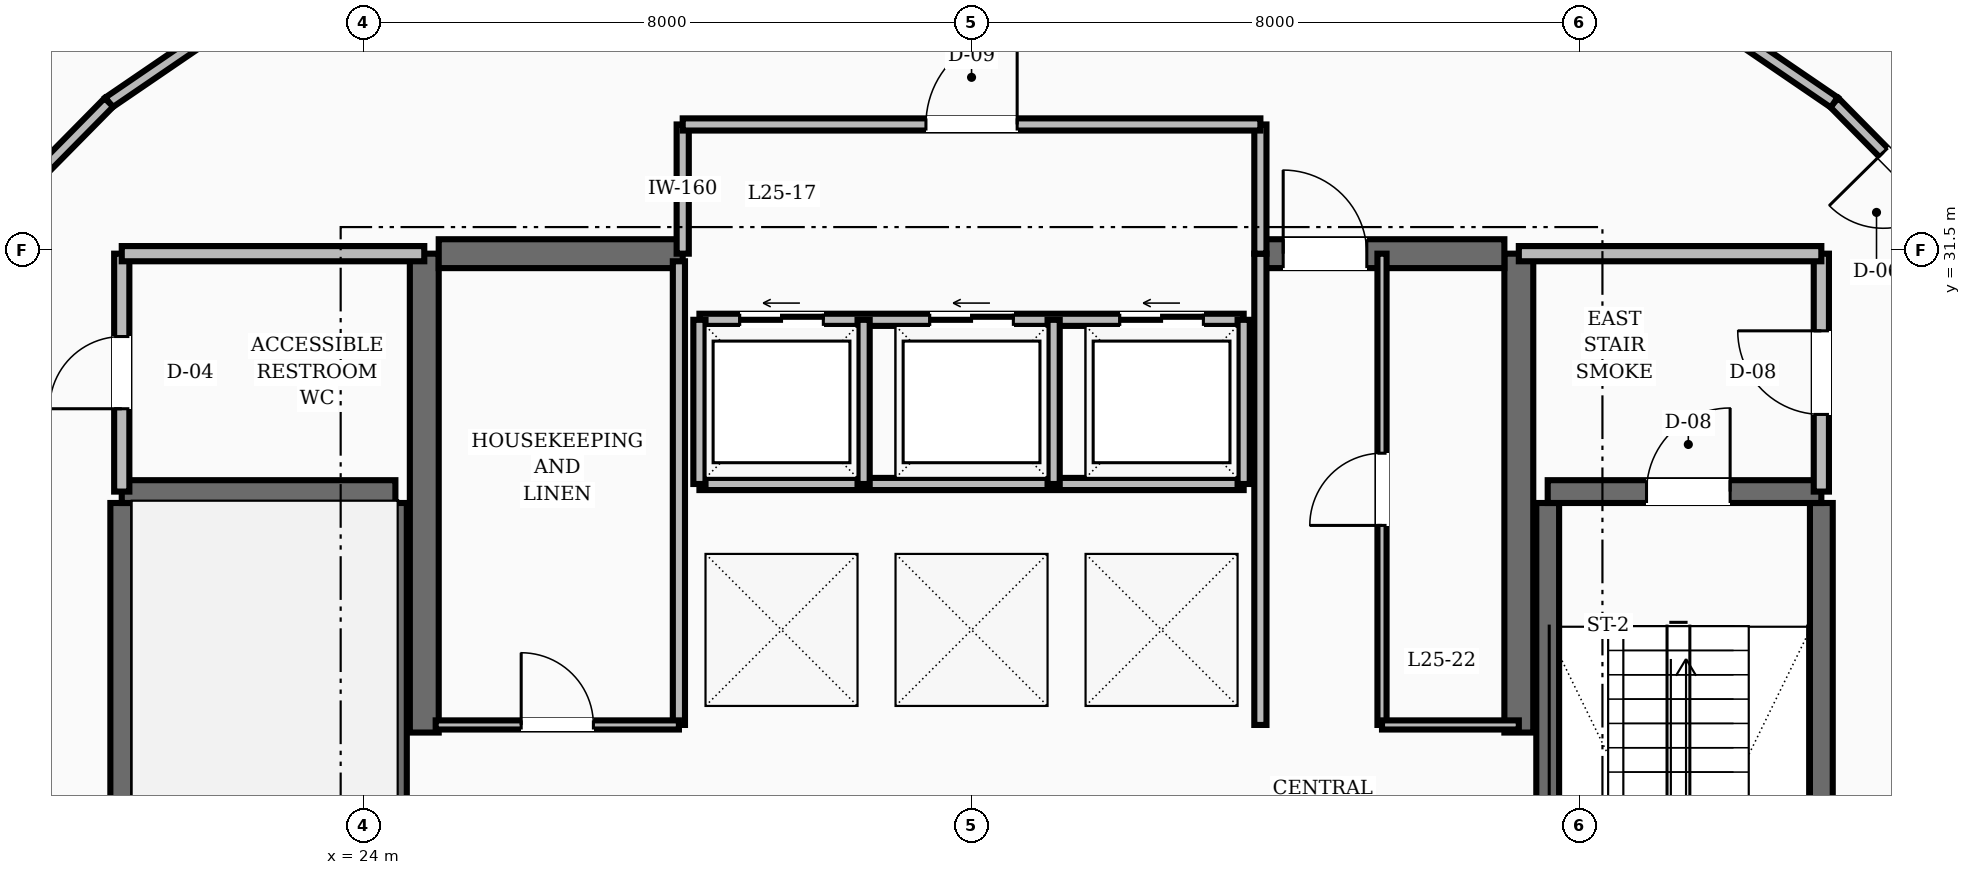
"""IFC4 building model, lengths in metres.
Left out: names, types, materials, properties, quantities, classifications, styles, units other than length and angle.
Written with IfcOpenShell. Run it as: python <this file> out.ifc"""

import sys

from ifc_helpers import new_model, si_unit, direction, frame, frame_2d, origin, place, context, subcontext, project, spatial, rectangle, extrude, element, fill, save


model = new_model("IFC4")
c1 = context("Model", 3, precision=1e-05, world=origin(), true_north=direction((0.0, 1.0)))
c2 = subcontext(c1, "Body", "Model", "MODEL_VIEW")
j1 = project(units=[si_unit("LENGTHUNIT", "METRE"), si_unit("PLANEANGLEUNIT", "RADIAN")], contexts=[c1])
p1 = place(None, origin())
s1 = spatial("IfcSite", under=j1, at=p1, CompositionType="ELEMENT")
p2 = place(p1, origin())
s2 = spatial("IfcBuilding", under=s1, at=p2, CompositionType="ELEMENT")
p3 = place(p2, frame((0.0, 0.0, 98.8)))
s3 = spatial("IfcBuildingStorey", under=s2, at=p3, CompositionType="ELEMENT", Elevation=98.8)
for number, where, z_axis, x_axis in (
    (1, (24.8, 25.15, 0.0), (0.0, 0.0, 1.0), (0.0, 1.0, 0.0)),
    (2, (39.2, 25.15, 0.0), (0.0, 0.0, 1.0), (0.0, 1.0, 0.0)),
):
    element("IfcWall", number, at=place(p3, frame(where, z_axis=z_axis, x_axis=x_axis)), inside=s3, PredefinedType="SHEAR", context=c2, shape_type="SweptSolid", body=[
        extrude(rectangle(XDim=6.3, YDim=0.38, at=frame_2d((3.15, 0.0))), origin(), (0.0, 0.0, 1.0), 3.6),
    ])
p4 = place(p3, frame((24.99, 31.45, 0.0), z_axis=(0.0, 0.0, 1.0), x_axis=(1.0, 0.0, 0.0)))
e3 = element("IfcWall", 3, at=p4, inside=s3, PredefinedType="SHEAR", context=c2, shape_type="SweptSolid", body=[
    extrude(rectangle(XDim=3.21, YDim=0.38, at=frame_2d((1.605, 0.0))), origin(), (0.0, 0.0, 1.0), 3.6),
])
p5 = place(p3, frame((35.8, 31.45, 0.0), z_axis=(0.0, 0.0, 1.0), x_axis=(1.0, 0.0, 0.0)))
e4 = element("IfcWall", 4, at=p5, inside=s3, PredefinedType="SHEAR", context=c2, shape_type="SweptSolid", body=[
    extrude(rectangle(XDim=3.21, YDim=0.38, at=frame_2d((1.605, 0.0))), origin(), (0.0, 0.0, 1.0), 3.6),
])
p6 = place(p5, frame((0.3, 0.0, 0.0)))
e5 = element("IfcOpeningElement", 5, at=p6, cuts=e4, PredefinedType="OPENING", context=c2, shape_type="SweptSolid", body=[
    extrude(rectangle(XDim=1.1, YDim=2.1, at=frame_2d((0.55, 1.05))), frame((0.0, 0.2, 0.0), z_axis=(0.0, -1.0, 0.0), x_axis=(1.0, 0.0, 0.0)), (0.0, 0.0, 1.0), 0.4),
])
for number, where, z_axis, x_axis in (
    (6, (20.82, 19.43, 0.0), (0.0, 0.0, 1.0), (0.0, 1.0, 0.0)),
    (7, (24.42, 19.43, 0.0), (0.0, 0.0, 1.0), (0.0, 1.0, 0.0)),
):
    element("IfcWall", number, at=place(p3, frame(where, z_axis=z_axis, x_axis=x_axis)), inside=s3, PredefinedType="SHEAR", context=c2, shape_type="SweptSolid", body=[
        extrude(rectangle(XDim=8.74, YDim=0.3, at=frame_2d((4.37, 0.0))), origin(), (0.0, 0.0, 1.0), 3.6),
    ])
p7 = place(p3, frame((20.82, 28.32, 0.0), z_axis=(0.0, 0.0, 1.0), x_axis=(1.0, 0.0, 0.0)))
e8 = element("IfcWall", 8, at=p7, inside=s3, PredefinedType="SHEAR", context=c2, shape_type="SweptSolid", body=[
    extrude(rectangle(XDim=3.6, YDim=0.3, at=frame_2d((1.8, 0.0))), origin(), (0.0, 0.0, 1.0), 3.6),
])
for number, where, z_axis, x_axis in (
    (9, (43.18, 19.43, 0.0), (0.0, 0.0, 1.0), (0.0, 1.0, 0.0)),
    (10, (39.58, 19.43, 0.0), (0.0, 0.0, 1.0), (0.0, 1.0, 0.0)),
):
    element("IfcWall", number, at=place(p3, frame(where, z_axis=z_axis, x_axis=x_axis)), inside=s3, PredefinedType="SHEAR", context=c2, shape_type="SweptSolid", body=[
        extrude(rectangle(XDim=8.74, YDim=0.3, at=frame_2d((4.37, 0.0))), origin(), (0.0, 0.0, 1.0), 3.6),
    ])
p8 = place(p3, frame((39.58, 28.32, 0.0), z_axis=(0.0, 0.0, 1.0), x_axis=(1.0, 0.0, 0.0)))
e11 = element("IfcWall", 11, at=p8, inside=s3, PredefinedType="SHEAR", context=c2, shape_type="SweptSolid", body=[
    extrude(rectangle(XDim=3.6, YDim=0.3, at=frame_2d((1.8, 0.0))), origin(), (0.0, 0.0, 1.0), 3.6),
])
p9 = place(p8, frame((1.3, 0.0, 0.0)))
e12 = element("IfcOpeningElement", 12, at=p9, cuts=e11, PredefinedType="OPENING", context=c2, shape_type="SweptSolid", body=[
    extrude(rectangle(XDim=1.1, YDim=2.1, at=frame_2d((0.55, 1.05))), frame((0.0, 0.16, 0.0), z_axis=(0.0, -1.0, 0.0), x_axis=(1.0, 0.0, 0.0)), (0.0, 0.0, 1.0), 0.32),
])
p10 = place(p3, frame((43.18, 28.32, 0.0), z_axis=(0.0, 0.0, 1.0), x_axis=(0.0, 1.0, 0.0)))
e13 = element("IfcWall", 13, at=p10, inside=s3, PredefinedType="SOLIDWALL", context=c2, shape_type="SweptSolid", body=[
    extrude(rectangle(XDim=3.13, YDim=0.2, at=frame_2d((1.565, 0.0))), origin(), (0.0, 0.0, 1.0), 2.71),
])
p11 = place(p10, frame((1.015, 0.0, 0.0)))
e14 = element("IfcOpeningElement", 14, at=p11, cuts=e13, PredefinedType="OPENING", context=c2, shape_type="SweptSolid", body=[
    extrude(rectangle(XDim=1.1, YDim=2.1, at=frame_2d((0.55, 1.05))), frame((0.0, 0.11, 0.0), z_axis=(0.0, -1.0, 0.0), x_axis=(1.0, 0.0, 0.0)), (0.0, 0.0, 1.0), 0.22),
])
p12 = place(p3, frame((39.2, 31.45, 0.0), z_axis=(0.0, 0.0, 1.0), x_axis=(1.0, 0.0, 0.0)))
e15 = element("IfcWall", 15, at=p12, inside=s3, PredefinedType="SOLIDWALL", context=c2, shape_type="SweptSolid", body=[
    extrude(rectangle(XDim=3.98, YDim=0.2, at=frame_2d((1.99, 0.0))), origin(), (0.0, 0.0, 1.0), 2.71),
])
p13 = place(p3, frame((20.82, 28.32, 0.0), z_axis=(0.0, 0.0, 1.0), x_axis=(0.0, 1.0, 0.0)))
e16 = element("IfcWall", 16, at=p13, inside=s3, PredefinedType="SOLIDWALL", context=c2, shape_type="SweptSolid", body=[
    extrude(rectangle(XDim=3.13, YDim=0.2, at=frame_2d((1.565, 0.0))), origin(), (0.0, 0.0, 1.0), 2.71),
])
p14 = place(p13, frame((1.09, 0.0, 0.0)))
e17 = element("IfcOpeningElement", 17, at=p14, cuts=e16, PredefinedType="OPENING", context=c2, shape_type="SweptSolid", body=[
    extrude(rectangle(XDim=0.95, YDim=2.1, at=frame_2d((0.475, 1.05))), frame((0.0, 0.11, 0.0), z_axis=(0.0, -1.0, 0.0), x_axis=(1.0, 0.0, 0.0)), (0.0, 0.0, 1.0), 0.22),
])
p15 = place(p3, frame((20.82, 31.45, 0.0), z_axis=(0.0, 0.0, 1.0), x_axis=(1.0, 0.0, 0.0)))
e18 = element("IfcWall", 18, at=p15, inside=s3, PredefinedType="SOLIDWALL", context=c2, shape_type="SweptSolid", body=[
    extrude(rectangle(XDim=3.98, YDim=0.2, at=frame_2d((1.99, 0.0))), origin(), (0.0, 0.0, 1.0), 2.71),
])
p16 = place(p3, frame((35.8, 25.25, 0.0), z_axis=(0.0, 0.0, 1.0), x_axis=(0.0, 1.0, 0.0)))
e19 = element("IfcWall", 19, at=p16, inside=s3, PredefinedType="SOLIDWALL", context=c2, shape_type="SweptSolid", body=[
    extrude(rectangle(XDim=6.2, YDim=0.16, at=frame_2d((3.1, 0.0))), origin(), (0.0, 0.0, 1.0), 2.71),
])
p17 = place(p3, frame((28.42, 30.58, 0.0), z_axis=(0.0, 0.0, 1.0), x_axis=(1.0, 0.0, 0.0)))
e20 = element("IfcWall", 20, at=p17, inside=s3, PredefinedType="SOLIDWALL", context=c2, shape_type="SweptSolid", body=[
    extrude(rectangle(XDim=7.16, YDim=0.16, at=frame_2d((3.58, 0.0))), origin(), (0.0, 0.0, 1.0), 2.71),
])
p18 = place(p17, frame((0.53, 0.0, 0.0)))
e21 = element("IfcOpeningElement", 21, at=p18, cuts=e20, PredefinedType="OPENING", context=c2, shape_type="SweptSolid", body=[
    extrude(rectangle(XDim=1.1, YDim=2.15, at=frame_2d((0.55, 1.075))), frame((0.0, 0.09, 0.0), z_axis=(0.0, -1.0, 0.0), x_axis=(1.0, 0.0, 0.0)), (0.0, 0.0, 1.0), 0.18),
])
p19 = place(p17, frame((3.03, 0.0, 0.0)))
e22 = element("IfcOpeningElement", 22, at=p19, cuts=e20, PredefinedType="OPENING", context=c2, shape_type="SweptSolid", body=[
    extrude(rectangle(XDim=1.1, YDim=2.15, at=frame_2d((0.55, 1.075))), frame((0.0, 0.09, 0.0), z_axis=(0.0, -1.0, 0.0), x_axis=(1.0, 0.0, 0.0)), (0.0, 0.0, 1.0), 0.18),
])
p20 = place(p17, frame((5.53, 0.0, 0.0)))
e23 = element("IfcOpeningElement", 23, at=p20, cuts=e20, PredefinedType="OPENING", context=c2, shape_type="SweptSolid", body=[
    extrude(rectangle(XDim=1.1, YDim=2.15, at=frame_2d((0.55, 1.075))), frame((0.0, 0.09, 0.0), z_axis=(0.0, -1.0, 0.0), x_axis=(1.0, 0.0, 0.0)), (0.0, 0.0, 1.0), 0.18),
])
p21 = place(p3, frame((28.42, 28.42, 0.0), z_axis=(0.0, 0.0, 1.0), x_axis=(1.0, 0.0, 0.0)))
e24 = element("IfcWall", 24, at=p21, inside=s3, PredefinedType="SOLIDWALL", context=c2, shape_type="SweptSolid", body=[
    extrude(rectangle(XDim=7.16, YDim=0.16, at=frame_2d((3.58, 0.0))), origin(), (0.0, 0.0, 1.0), 2.71),
])
for number, where, z_axis, x_axis in (
    (25, (28.42, 28.42, 0.0), (0.0, 0.0, 1.0), (0.0, 1.0, 0.0)),
    (26, (30.58, 28.42, 0.0), (0.0, 0.0, 1.0), (0.0, 1.0, 0.0)),
    (27, (33.08, 28.42, 0.0), (0.0, 0.0, 1.0), (0.0, 1.0, 0.0)),
    (28, (35.58, 28.42, 0.0), (0.0, 0.0, 1.0), (0.0, 1.0, 0.0)),
):
    element("IfcWall", number, at=place(p3, frame(where, z_axis=z_axis, x_axis=x_axis)), inside=s3, PredefinedType="SOLIDWALL", context=c2, shape_type="SweptSolid", body=[
        extrude(rectangle(XDim=2.16, YDim=0.16, at=frame_2d((1.08, 0.0))), origin(), (0.0, 0.0, 1.0), 2.71),
    ])
for number, where, z_axis, x_axis in (
    (29, (28.2, 31.45, 0.0), (0.0, 0.0, 1.0), (0.0, 1.0, 0.0)),
    (30, (35.8, 31.45, 0.0), (0.0, 0.0, 1.0), (0.0, 1.0, 0.0)),
):
    element("IfcWall", number, at=place(p3, frame(where, z_axis=z_axis, x_axis=x_axis)), inside=s3, PredefinedType="SOLIDWALL", context=c2, shape_type="SweptSolid", body=[
        extrude(rectangle(XDim=1.7, YDim=0.16, at=frame_2d((0.85, 0.0))), origin(), (0.0, 0.0, 1.0), 2.71),
    ])
p22 = place(p3, frame((28.2, 33.15, 0.0), z_axis=(0.0, 0.0, 1.0), x_axis=(1.0, 0.0, 0.0)))
e31 = element("IfcWall", 31, at=p22, inside=s3, PredefinedType="SOLIDWALL", context=c2, shape_type="SweptSolid", body=[
    extrude(rectangle(XDim=7.6, YDim=0.16, at=frame_2d((3.8, 0.0))), origin(), (0.0, 0.0, 1.0), 2.71),
])
p23 = place(p22, frame((3.2, 0.0, 0.0)))
e32 = element("IfcOpeningElement", 32, at=p23, cuts=e31, PredefinedType="OPENING", context=c2, shape_type="SweptSolid", body=[
    extrude(rectangle(XDim=1.2, YDim=2.1, at=frame_2d((0.6, 1.05))), frame((0.0, 0.09, 0.0), z_axis=(0.0, -1.0, 0.0), x_axis=(1.0, 0.0, 0.0)), (0.0, 0.0, 1.0), 0.18),
])
p24 = place(p3, frame((28.15, 25.25, 0.0), z_axis=(0.0, 0.0, 1.0), x_axis=(0.0, 1.0, 0.0)))
e33 = element("IfcWall", 33, at=p24, inside=s3, PredefinedType="SOLIDWALL", context=c2, shape_type="SweptSolid", body=[
    extrude(rectangle(XDim=6.1, YDim=0.16, at=frame_2d((3.05, 0.0))), origin(), (0.0, 0.0, 1.0), 2.71),
])
p25 = place(p3, frame((24.95, 25.25, 0.0), z_axis=(0.0, 0.0, 1.0), x_axis=(1.0, 0.0, 0.0)))
e34 = element("IfcWall", 34, at=p25, inside=s3, PredefinedType="PARTITIONING", context=c2, shape_type="SweptSolid", body=[
    extrude(rectangle(XDim=3.2, YDim=0.12, at=frame_2d((1.6, 0.0))), origin(), (0.0, 0.0, 1.0), 2.71),
])
p26 = place(p25, frame((1.125, 0.0, 0.0)))
e35 = element("IfcOpeningElement", 35, at=p26, cuts=e34, PredefinedType="OPENING", context=c2, shape_type="SweptSolid", body=[
    extrude(rectangle(XDim=0.95, YDim=2.1, at=frame_2d((0.475, 1.05))), frame((0.0, 0.07, 0.0), z_axis=(0.0, -1.0, 0.0), x_axis=(1.0, 0.0, 0.0)), (0.0, 0.0, 1.0), 0.14),
])
p27 = place(p3, frame((37.4, 25.25, 0.0), z_axis=(0.0, 0.0, 1.0), x_axis=(0.0, 1.0, 0.0)))
e36 = element("IfcWall", 36, at=p27, inside=s3, PredefinedType="PARTITIONING", context=c2, shape_type="SweptSolid", body=[
    extrude(rectangle(XDim=6.2, YDim=0.12, at=frame_2d((3.1, 0.0))), origin(), (0.0, 0.0, 1.0), 2.71),
])
p28 = place(p27, frame((2.625, 0.0, 0.0)))
e37 = element("IfcOpeningElement", 37, at=p28, cuts=e36, PredefinedType="OPENING", context=c2, shape_type="SweptSolid", body=[
    extrude(rectangle(XDim=0.95, YDim=2.1, at=frame_2d((0.475, 1.05))), frame((0.0, 0.07, 0.0), z_axis=(0.0, -1.0, 0.0), x_axis=(1.0, 0.0, 0.0)), (0.0, 0.0, 1.0), 0.14),
])
p29 = place(p3, frame((37.4, 25.25, 0.0), z_axis=(0.0, 0.0, 1.0), x_axis=(1.0, 0.0, 0.0)))
e38 = element("IfcWall", 38, at=p29, inside=s3, PredefinedType="PARTITIONING", context=c2, shape_type="SweptSolid", body=[
    extrude(rectangle(XDim=1.8, YDim=0.12, at=frame_2d((0.9, 0.0))), origin(), (0.0, 0.0, 1.0), 2.71),
])
p30 = place(p3, frame((45.345, 31.417, 0.0), z_axis=(0.0, 0.0, 1.0), x_axis=(-0.702366174226, 0.711815816981, 0.0)))
e39 = element("IfcWall", 39, at=p30, inside=s3, PredefinedType="SOLIDWALL", context=c2, shape_type="SweptSolid", body=[
    extrude(rectangle(XDim=2.842, YDim=0.16, at=frame_2d((1.421, 0.0))), origin(), (0.0, 0.0, 1.0), 2.71),
])
p31 = place(p30, frame((0.921, 0.0, 0.0)))
e40 = element("IfcOpeningElement", 40, at=p31, cuts=e39, PredefinedType="OPENING", context=c2, shape_type="SweptSolid", body=[
    extrude(rectangle(XDim=1.0, YDim=2.1, at=frame_2d((0.5, 1.05))), frame((0.0, 0.09, 0.0), z_axis=(0.0, -1.0, 0.0), x_axis=(1.0, 0.0, 0.0)), (0.0, 0.0, 1.0), 0.18),
])
for number, where, z_axis, x_axis in (
    (41, (43.349, 33.44, 0.0), (0.0, 0.0, 1.0), (-0.826, 0.564, 0.0)),
    (42, (23.083, 35.1, 0.0), (0.0, 0.0, 1.0), (-0.826, -0.564, 0.0)),
):
    element("IfcWall", number, at=place(p3, frame(where, z_axis=z_axis, x_axis=x_axis)), inside=s3, PredefinedType="SOLIDWALL", context=c2, shape_type="SweptSolid", body=[
        extrude(rectangle(XDim=2.945, YDim=0.16, at=frame_2d((1.472, 0.0))), origin(), (0.0, 0.0, 1.0), 2.71),
    ])
p32 = place(p3, frame((20.651, 33.44, 0.0), z_axis=(0.0, 0.0, 1.0), x_axis=(-0.702366174226, -0.711815816981, 0.0)))
e43 = element("IfcWall", 43, at=p32, inside=s3, PredefinedType="SOLIDWALL", context=c2, shape_type="SweptSolid", body=[
    extrude(rectangle(XDim=2.842, YDim=0.16, at=frame_2d((1.421, 0.0))), origin(), (0.0, 0.0, 1.0), 2.71),
])
p33 = place(p9, origin())
e44 = element("IfcDoor", 44, at=p33, inside=s3, OperationType="SINGLE_SWING_RIGHT", PredefinedType="DOOR", context=c2, shape_type="SweptSolid", body=[
    extrude(rectangle(XDim=1.1, YDim=2.1, at=frame_2d((0.55, 1.05))), frame((0.0, 0.025, 0.0), z_axis=(0.0, -1.0, 0.0), x_axis=(1.0, 0.0, 0.0)), (0.0, 0.0, 1.0), 0.05),
])
fill(e12, e44)
p34 = place(p11, origin())
e45 = element("IfcDoor", 45, at=p34, inside=s3, OperationType="SINGLE_SWING_RIGHT", PredefinedType="DOOR", context=c2, shape_type="SweptSolid", body=[
    extrude(rectangle(XDim=1.1, YDim=2.1, at=frame_2d((0.55, 1.05))), frame((0.0, 0.025, 0.0), z_axis=(0.0, -1.0, 0.0), x_axis=(1.0, 0.0, 0.0)), (0.0, 0.0, 1.0), 0.05),
])
fill(e14, e45)
p35 = place(p14, origin())
e46 = element("IfcDoor", 46, at=p35, inside=s3, OperationType="SINGLE_SWING_LEFT", PredefinedType="DOOR", context=c2, shape_type="SweptSolid", body=[
    extrude(rectangle(XDim=0.95, YDim=2.1, at=frame_2d((0.475, 1.05))), frame((0.0, 0.025, 0.0), z_axis=(0.0, -1.0, 0.0), x_axis=(1.0, 0.0, 0.0)), (0.0, 0.0, 1.0), 0.05),
])
fill(e17, e46)
p36 = place(p6, origin())
e47 = element("IfcDoor", 47, at=p36, inside=s3, OperationType="SINGLE_SWING_LEFT", PredefinedType="DOOR", context=c2, shape_type="SweptSolid", body=[
    extrude(rectangle(XDim=1.1, YDim=2.1, at=frame_2d((0.55, 1.05))), frame((0.0, 0.025, 0.0), z_axis=(0.0, -1.0, 0.0), x_axis=(1.0, 0.0, 0.0)), (0.0, 0.0, 1.0), 0.05),
])
fill(e5, e47)
p37 = place(p18, origin())
e48 = element("IfcDoor", 48, at=p37, inside=s3, OperationType="SLIDING_TO_LEFT", PredefinedType="DOOR", context=c2, shape_type="SweptSolid", body=[
    extrude(rectangle(XDim=1.1, YDim=2.15, at=frame_2d((0.55, 1.075))), frame((0.0, 0.025, 0.0), z_axis=(0.0, -1.0, 0.0), x_axis=(1.0, 0.0, 0.0)), (0.0, 0.0, 1.0), 0.05),
])
fill(e21, e48)
p38 = place(p19, origin())
e49 = element("IfcDoor", 49, at=p38, inside=s3, OperationType="SLIDING_TO_LEFT", PredefinedType="DOOR", context=c2, shape_type="SweptSolid", body=[
    extrude(rectangle(XDim=1.1, YDim=2.15, at=frame_2d((0.55, 1.075))), frame((0.0, 0.025, 0.0), z_axis=(0.0, -1.0, 0.0), x_axis=(1.0, 0.0, 0.0)), (0.0, 0.0, 1.0), 0.05),
])
fill(e22, e49)
p39 = place(p20, origin())
e50 = element("IfcDoor", 50, at=p39, inside=s3, OperationType="SLIDING_TO_LEFT", PredefinedType="DOOR", context=c2, shape_type="SweptSolid", body=[
    extrude(rectangle(XDim=1.1, YDim=2.15, at=frame_2d((0.55, 1.075))), frame((0.0, 0.025, 0.0), z_axis=(0.0, -1.0, 0.0), x_axis=(1.0, 0.0, 0.0)), (0.0, 0.0, 1.0), 0.05),
])
fill(e23, e50)
p40 = place(p23, origin())
e51 = element("IfcDoor", 51, at=p40, inside=s3, OperationType="SINGLE_SWING_RIGHT", PredefinedType="DOOR", context=c2, shape_type="SweptSolid", body=[
    extrude(rectangle(XDim=1.2, YDim=2.1, at=frame_2d((0.6, 1.05))), frame((0.0, 0.025, 0.0), z_axis=(0.0, -1.0, 0.0), x_axis=(1.0, 0.0, 0.0)), (0.0, 0.0, 1.0), 0.05),
])
fill(e32, e51)
p41 = place(p26, origin())
e52 = element("IfcDoor", 52, at=p41, inside=s3, OperationType="SINGLE_SWING_LEFT", PredefinedType="DOOR", context=c2, shape_type="SweptSolid", body=[
    extrude(rectangle(XDim=0.95, YDim=2.1, at=frame_2d((0.475, 1.05))), frame((0.0, 0.025, 0.0), z_axis=(0.0, -1.0, 0.0), x_axis=(1.0, 0.0, 0.0)), (0.0, 0.0, 1.0), 0.05),
])
fill(e35, e52)
p42 = place(p28, origin())
e53 = element("IfcDoor", 53, at=p42, inside=s3, OperationType="SINGLE_SWING_LEFT", PredefinedType="DOOR", context=c2, shape_type="SweptSolid", body=[
    extrude(rectangle(XDim=0.95, YDim=2.1, at=frame_2d((0.475, 1.05))), frame((0.0, 0.025, 0.0), z_axis=(0.0, -1.0, 0.0), x_axis=(1.0, 0.0, 0.0)), (0.0, 0.0, 1.0), 0.05),
])
fill(e37, e53)
p43 = place(p31, origin())
e54 = element("IfcDoor", 54, at=p43, inside=s3, OperationType="SINGLE_SWING_RIGHT", PredefinedType="DOOR", context=c2, shape_type="SweptSolid", body=[
    extrude(rectangle(XDim=1.0, YDim=2.1, at=frame_2d((0.5, 1.05))), frame((0.0, 0.025, 0.0), z_axis=(0.0, -1.0, 0.0), x_axis=(1.0, 0.0, 0.0)), (0.0, 0.0, 1.0), 0.05),
])
fill(e40, e54)
save(model, sys.argv[1])
